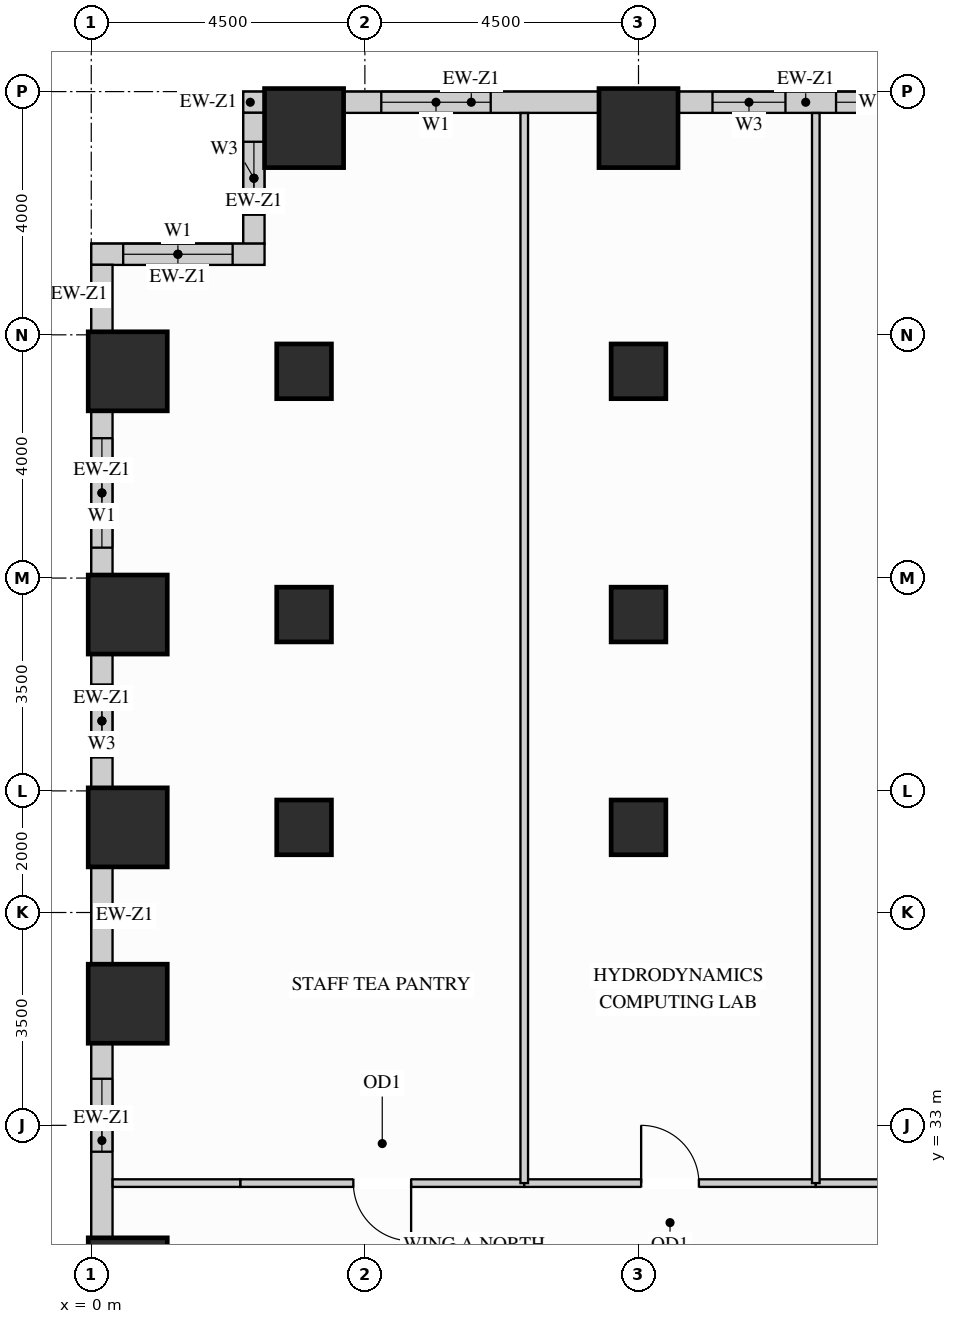
"""IFC4 building model, lengths in metres.
Left out: names, types, materials, properties, quantities, classifications, styles, units other than length and angle.
Written with IfcOpenShell. Run it as: python <this file> out.ifc"""

import sys

from ifc_helpers import new_model, si_unit, direction, frame, frame_2d, origin, origin_2d, place, context, subcontext, project, spatial, rectangle, extrude, source, transform, mapped, element, fill, save


model = new_model("IFC4")
c1 = context("Model", 3, precision=1e-05, world=origin(), true_north=direction((0.0, 1.0)))
c2 = subcontext(c1, "Body", "Model", "MODEL_VIEW")
j1 = project(units=[si_unit("LENGTHUNIT", "METRE"), si_unit("PLANEANGLEUNIT", "RADIAN")], contexts=[c1])
p1 = place(None, origin())
s1 = spatial("IfcSite", under=j1, at=p1, CompositionType="ELEMENT")
p2 = place(p1, origin())
s2 = spatial("IfcBuilding", under=s1, at=p2, CompositionType="ELEMENT")
p3 = place(p2, frame((0.0, 0.0, 58.5)))
s3 = spatial("IfcBuildingStorey", under=s2, at=p3, CompositionType="ELEMENT", Elevation=58.5)
m1 = source(origin(), c2, "Body", "SweptSolid", [
    extrude(rectangle(XDim=0.9, YDim=0.9, at=origin_2d()), origin(), (0.0, 0.0, 1.0), 3.38),
])
for number, where, z_axis, x_axis in (
    (1, (3.5, 37.9, 0.0), (0.0, 0.0, 1.0), (1.0, 0.0, 0.0)),
    (2, (3.5, 41.4, 0.0), (0.0, 0.0, 1.0), (1.0, 0.0, 0.0)),
    (3, (3.5, 45.4, 0.0), (0.0, 0.0, 1.0), (1.0, 0.0, 0.0)),
    (4, (9.0, 37.9, 0.0), (0.0, 0.0, 1.0), (1.0, 0.0, 0.0)),
    (5, (9.0, 41.4, 0.0), (0.0, 0.0, 1.0), (1.0, 0.0, 0.0)),
    (6, (9.0, 45.4, 0.0), (0.0, 0.0, 1.0), (1.0, 0.0, 0.0)),
):
    element("IfcColumn", number, at=place(p3, frame(where, z_axis=z_axis, x_axis=x_axis)), inside=s3, PredefinedType="COLUMN", context=c2, shape_type="MappedRepresentation", body=[
        mapped(m1, transform((0.0, 0.0, 0.0), x_axis=(1.0, 0.0, 0.0), y_axis=(0.0, 1.0, 0.0), z_axis=(0.0, 0.0, 1.0))),
    ])
m2 = source(origin(), c2, "Body", "SweptSolid", [
    extrude(rectangle(XDim=1.3, YDim=1.3, at=origin_2d()), origin(), (0.0, 0.0, 1.0), 3.38),
])
for number, where, z_axis, x_axis in (
    (7, (3.5, 49.4, 0.0), (0.0, 0.0, 1.0), (1.0, 0.0, 0.0)),
    (8, (9.0, 49.4, 0.0), (0.0, 0.0, 1.0), (1.0, 0.0, 0.0)),
    (9, (0.6, 30.5, 0.0), (0.0, 0.0, 1.0), (1.0, 0.0, 0.0)),
    (10, (0.6, 35.0, 0.0), (0.0, 0.0, 1.0), (1.0, 0.0, 0.0)),
    (11, (0.6, 37.9, 0.0), (0.0, 0.0, 1.0), (1.0, 0.0, 0.0)),
    (12, (0.6, 41.4, 0.0), (0.0, 0.0, 1.0), (1.0, 0.0, 0.0)),
    (13, (0.6, 45.4, 0.0), (0.0, 0.0, 1.0), (1.0, 0.0, 0.0)),
):
    element("IfcColumn", number, at=place(p3, frame(where, z_axis=z_axis, x_axis=x_axis)), inside=s3, PredefinedType="COLUMN", context=c2, shape_type="MappedRepresentation", body=[
        mapped(m2, transform((0.0, 0.0, 0.0), x_axis=(1.0, 0.0, 0.0), y_axis=(0.0, 1.0, 0.0), z_axis=(0.0, 0.0, 1.0))),
    ])
p4 = place(p3, frame((13.852, 49.825, 0.0), z_axis=(0.0, 0.0, 1.0), x_axis=(-1.0, 0.0, 0.0)))
e14 = element("IfcWall", 14, at=p4, inside=s3, PredefinedType="SOLIDWALL", context=c2, shape_type="SweptSolid", body=[
    extrude(rectangle(XDim=4.204, YDim=0.35, at=frame_2d((2.102, 0.0))), origin(), (0.0, 0.0, 1.0), 2.51),
])
p5 = place(p4, frame((0.403, 0.0, 0.78)))
e15 = element("IfcOpeningElement", 15, at=p5, cuts=e14, PredefinedType="OPENING", context=c2, shape_type="SweptSolid", body=[
    extrude(rectangle(XDim=1.2, YDim=1.55, at=frame_2d((0.6, 0.775))), frame((0.0, 0.185, 0.0), z_axis=(0.0, -1.0, 0.0), x_axis=(1.0, 0.0, 0.0)), (0.0, 0.0, 1.0), 0.37),
])
p6 = place(p4, frame((2.435, 0.0, 0.78)))
e16 = element("IfcOpeningElement", 16, at=p6, cuts=e14, PredefinedType="OPENING", context=c2, shape_type="SweptSolid", body=[
    extrude(rectangle(XDim=1.2, YDim=1.55, at=frame_2d((0.6, 0.775))), frame((0.0, 0.185, 0.0), z_axis=(0.0, -1.0, 0.0), x_axis=(1.0, 0.0, 0.0)), (0.0, 0.0, 1.0), 0.37),
])
p7 = place(p3, frame((8.352, 49.825, 0.0), z_axis=(0.0, 0.0, 1.0), x_axis=(-1.0, 0.0, 0.0)))
e17 = element("IfcWall", 17, at=p7, inside=s3, PredefinedType="SOLIDWALL", context=c2, shape_type="SweptSolid", body=[
    extrude(rectangle(XDim=4.204, YDim=0.35, at=frame_2d((2.102, 0.0))), origin(), (0.0, 0.0, 1.0), 2.51),
])
p8 = place(p7, frame((1.782, 0.0, 0.78)))
e18 = element("IfcOpeningElement", 18, at=p8, cuts=e17, PredefinedType="OPENING", context=c2, shape_type="SweptSolid", body=[
    extrude(rectangle(XDim=1.8, YDim=1.55, at=frame_2d((0.9, 0.775))), frame((0.0, 0.185, 0.0), z_axis=(0.0, -1.0, 0.0), x_axis=(1.0, 0.0, 0.0)), (0.0, 0.0, 1.0), 0.37),
])
m3 = source(origin(), c2, "Body", "SweptSolid", [
    extrude(rectangle(XDim=0.352, YDim=0.35, at=frame_2d((0.176, 0.0))), origin(), (0.0, 0.0, 1.0), 3.365),
])
p9 = place(p3, frame((2.852, 49.825, 0.0), z_axis=(0.0, 0.0, 1.0), x_axis=(-1.0, 0.0, 0.0)))
e19 = element("IfcWall", 19, at=p9, inside=s3, PredefinedType="SOLIDWALL", context=c2, shape_type="MappedRepresentation", body=[
    mapped(m3, transform((0.0, 0.0, 0.0), x_axis=(1.0, 0.0, 0.0), y_axis=(0.0, 1.0, 0.0), z_axis=(0.0, 0.0, 1.0))),
])
p10 = place(p3, frame((2.675, 49.652, 0.0), z_axis=(0.0, 0.0, 1.0), x_axis=(0.0, -1.0, 0.0)))
e20 = element("IfcWall", 20, at=p10, inside=s3, PredefinedType="SOLIDWALL", context=c2, shape_type="SweptSolid", body=[
    extrude(rectangle(XDim=2.154, YDim=0.35, at=frame_2d((1.077, 0.0))), origin(), (0.0, 0.0, 1.0), 3.365),
])
p11 = place(p10, frame((0.477, 0.0, 0.78)))
e21 = element("IfcOpeningElement", 21, at=p11, cuts=e20, PredefinedType="OPENING", context=c2, shape_type="SweptSolid", body=[
    extrude(rectangle(XDim=1.2, YDim=2.1, at=frame_2d((0.6, 1.05))), frame((0.0, 0.185, 0.0), z_axis=(0.0, -1.0, 0.0), x_axis=(1.0, 0.0, 0.0)), (0.0, 0.0, 1.0), 0.37),
])
p12 = place(p3, frame((2.85, 47.325, 0.0), z_axis=(0.0, 0.0, 1.0), x_axis=(-1.0, 0.0, 0.0)))
e22 = element("IfcWall", 22, at=p12, inside=s3, PredefinedType="SOLIDWALL", context=c2, shape_type="SweptSolid", body=[
    extrude(rectangle(XDim=2.85, YDim=0.35, at=frame_2d((1.425, 0.0))), origin(), (0.0, 0.0, 1.0), 3.365),
])
p13 = place(p12, frame((0.525, 0.0, 0.78)))
e23 = element("IfcOpeningElement", 23, at=p13, cuts=e22, PredefinedType="OPENING", context=c2, shape_type="SweptSolid", body=[
    extrude(rectangle(XDim=1.8, YDim=2.1, at=frame_2d((0.9, 1.05))), frame((0.0, 0.185, 0.0), z_axis=(0.0, -1.0, 0.0), x_axis=(1.0, 0.0, 0.0)), (0.0, 0.0, 1.0), 0.37),
])
m4 = source(origin(), c2, "Body", "SweptSolid", [
    extrude(rectangle(XDim=1.104, YDim=0.35, at=frame_2d((0.552, 0.0))), origin(), (0.0, 0.0, 1.0), 3.365),
])
p14 = place(p3, frame((0.175, 47.152, 0.0), z_axis=(0.0, 0.0, 1.0), x_axis=(0.0, -1.0, 0.0)))
e24 = element("IfcWall", 24, at=p14, inside=s3, PredefinedType="SOLIDWALL", context=c2, shape_type="MappedRepresentation", body=[
    mapped(m4, transform((0.0, 0.0, 0.0), x_axis=(1.0, 0.0, 0.0), y_axis=(0.0, 1.0, 0.0), z_axis=(0.0, 0.0, 1.0))),
])
p15 = place(p3, frame((0.175, 44.752, 0.0), z_axis=(0.0, 0.0, 1.0), x_axis=(0.0, -1.0, 0.0)))
e25 = element("IfcWall", 25, at=p15, inside=s3, PredefinedType="SOLIDWALL", context=c2, shape_type="SweptSolid", body=[
    extrude(rectangle(XDim=2.704, YDim=0.35, at=frame_2d((1.352, 0.0))), origin(), (0.0, 0.0, 1.0), 2.51),
])
p16 = place(p15, frame((0.452, 0.0, 0.78)))
e26 = element("IfcOpeningElement", 26, at=p16, cuts=e25, PredefinedType="OPENING", context=c2, shape_type="SweptSolid", body=[
    extrude(rectangle(XDim=1.8, YDim=1.55, at=frame_2d((0.9, 0.775))), frame((0.0, 0.185, 0.0), z_axis=(0.0, -1.0, 0.0), x_axis=(1.0, 0.0, 0.0)), (0.0, 0.0, 1.0), 0.37),
])
p17 = place(p3, frame((0.175, 40.752, 0.0), z_axis=(0.0, 0.0, 1.0), x_axis=(0.0, -1.0, 0.0)))
e27 = element("IfcWall", 27, at=p17, inside=s3, PredefinedType="SOLIDWALL", context=c2, shape_type="SweptSolid", body=[
    extrude(rectangle(XDim=2.204, YDim=0.35, at=frame_2d((1.102, 0.0))), origin(), (0.0, 0.0, 1.0), 2.51),
])
p18 = place(p17, frame((0.502, 0.0, 0.78)))
e28 = element("IfcOpeningElement", 28, at=p18, cuts=e27, PredefinedType="OPENING", context=c2, shape_type="SweptSolid", body=[
    extrude(rectangle(XDim=1.2, YDim=1.55, at=frame_2d((0.6, 0.775))), frame((0.0, 0.185, 0.0), z_axis=(0.0, -1.0, 0.0), x_axis=(1.0, 0.0, 0.0)), (0.0, 0.0, 1.0), 0.37),
])
m5 = source(origin(), c2, "Body", "SweptSolid", [
    extrude(rectangle(XDim=1.604, YDim=0.35, at=frame_2d((0.802, 0.0))), origin(), (0.0, 0.0, 1.0), 2.51),
])
p19 = place(p3, frame((0.175, 37.252, 0.0), z_axis=(0.0, 0.0, 1.0), x_axis=(0.0, -1.0, 0.0)))
e29 = element("IfcWall", 29, at=p19, inside=s3, PredefinedType="SOLIDWALL", context=c2, shape_type="MappedRepresentation", body=[
    mapped(m5, transform((0.0, 0.0, 0.0), x_axis=(1.0, 0.0, 0.0), y_axis=(0.0, 1.0, 0.0), z_axis=(0.0, 0.0, 1.0))),
])
p20 = place(p3, frame((0.175, 34.352, 0.0), z_axis=(0.0, 0.0, 1.0), x_axis=(0.0, -1.0, 0.0)))
e30 = element("IfcWall", 30, at=p20, inside=s3, PredefinedType="SOLIDWALL", context=c2, shape_type="SweptSolid", body=[
    extrude(rectangle(XDim=3.204, YDim=0.35, at=frame_2d((1.602, 0.0))), origin(), (0.0, 0.0, 1.0), 2.51),
])
p21 = place(p20, frame((0.586, 0.0, 0.78)))
e31 = element("IfcOpeningElement", 31, at=p21, cuts=e30, PredefinedType="OPENING", context=c2, shape_type="SweptSolid", body=[
    extrude(rectangle(XDim=1.2, YDim=1.55, at=frame_2d((0.6, 0.775))), frame((0.0, 0.185, 0.0), z_axis=(0.0, -1.0, 0.0), x_axis=(1.0, 0.0, 0.0)), (0.0, 0.0, 1.0), 0.37),
])
p22 = place(p3, frame((2.45, 32.05, 0.0), z_axis=(0.0, 0.0, 1.0), x_axis=(1.0, 0.0, 0.0)))
e32 = element("IfcWall", 32, at=p22, inside=s3, PredefinedType="PARTITIONING", context=c2, shape_type="SweptSolid", body=[
    extrude(rectangle(XDim=4.671, YDim=0.125, at=frame_2d((2.335, 0.0))), origin(), (0.0, 0.0, 1.0), 3.365),
])
p23 = place(p22, frame((1.861, 0.0, 0.0)))
e33 = element("IfcOpeningElement", 33, at=p23, cuts=e32, PredefinedType="OPENING", context=c2, shape_type="SweptSolid", body=[
    extrude(rectangle(XDim=0.95, YDim=2.15, at=frame_2d((0.475, 1.075))), frame((0.0, 0.073, 0.0), z_axis=(0.0, -1.0, 0.0), x_axis=(1.0, 0.0, 0.0)), (0.0, 0.0, 1.0), 0.145),
])
p24 = place(p3, frame((7.121, 32.05, 0.0), z_axis=(0.0, 0.0, 1.0), x_axis=(1.0, 0.0, 0.0)))
e34 = element("IfcWall", 34, at=p24, inside=s3, PredefinedType="PARTITIONING", context=c2, shape_type="SweptSolid", body=[
    extrude(rectangle(XDim=4.795, YDim=0.125, at=frame_2d((2.397, 0.0))), origin(), (0.0, 0.0, 1.0), 3.365),
])
p25 = place(p24, frame((1.923, 0.0, 0.0)))
e35 = element("IfcOpeningElement", 35, at=p25, cuts=e34, PredefinedType="OPENING", context=c2, shape_type="SweptSolid", body=[
    extrude(rectangle(XDim=0.95, YDim=2.15, at=frame_2d((0.475, 1.075))), frame((0.0, 0.073, 0.0), z_axis=(0.0, -1.0, 0.0), x_axis=(1.0, 0.0, 0.0)), (0.0, 0.0, 1.0), 0.145),
])
p26 = place(p3, frame((11.916, 32.05, 0.0), z_axis=(0.0, 0.0, 1.0), x_axis=(1.0, 0.0, 0.0)))
e36 = element("IfcWall", 36, at=p26, inside=s3, PredefinedType="PARTITIONING", context=c2, shape_type="SweptSolid", body=[
    extrude(rectangle(XDim=4.634, YDim=0.125, at=frame_2d((2.317, 0.0))), origin(), (0.0, 0.0, 1.0), 3.365),
])
p27 = place(p26, frame((1.842, 0.0, 0.0)))
e37 = element("IfcOpeningElement", 37, at=p27, cuts=e36, PredefinedType="OPENING", context=c2, shape_type="SweptSolid", body=[
    extrude(rectangle(XDim=0.95, YDim=2.15, at=frame_2d((0.475, 1.075))), frame((0.0, 0.073, 0.0), z_axis=(0.0, -1.0, 0.0), x_axis=(1.0, 0.0, 0.0)), (0.0, 0.0, 1.0), 0.145),
])
m6 = source(origin(), c2, "Body", "SweptSolid", [
    extrude(rectangle(XDim=2.098, YDim=0.125, at=frame_2d((1.049, 0.0))), origin(), (0.0, 0.0, 1.0), 3.365),
])
p28 = place(p3, frame((0.352, 32.05, 0.0), z_axis=(0.0, 0.0, 1.0), x_axis=(1.0, 0.0, 0.0)))
e38 = element("IfcWall", 38, at=p28, inside=s3, PredefinedType="PARTITIONING", context=c2, shape_type="MappedRepresentation", body=[
    mapped(m6, transform((0.0, 0.0, 0.0), x_axis=(1.0, 0.0, 0.0), y_axis=(0.0, 1.0, 0.0), z_axis=(0.0, 0.0, 1.0))),
])
m7 = source(origin(), c2, "Body", "SweptSolid", [
    extrude(rectangle(XDim=17.598, YDim=0.125, at=frame_2d((8.799, 0.0))), origin(), (0.0, 0.0, 1.0), 3.365),
])
for number, where, z_axis, x_axis in (
    (39, (7.121, 32.05, 0.0), (0.0, 0.0, 1.0), (0.0, 1.0, 0.0)),
    (40, (11.916, 32.05, 0.0), (0.0, 0.0, 1.0), (0.0, 1.0, 0.0)),
):
    element("IfcWall", number, at=place(p3, frame(where, z_axis=z_axis, x_axis=x_axis)), inside=s3, PredefinedType="PARTITIONING", context=c2, shape_type="MappedRepresentation", body=[
        mapped(m7, transform((0.0, 0.0, 0.0), x_axis=(1.0, 0.0, 0.0), y_axis=(0.0, 1.0, 0.0), z_axis=(0.0, 0.0, 1.0))),
    ])
m8 = source(origin(), c2, "Body", "SweptSolid", [
    extrude(rectangle(XDim=0.95, YDim=2.15, at=frame_2d((0.475, 1.075))), frame((0.0, 0.025, 0.0), z_axis=(0.0, -1.0, 0.0), x_axis=(1.0, 0.0, 0.0)), (0.0, 0.0, 1.0), 0.05),
])
p29 = place(p23, origin())
e41 = element("IfcDoor", 41, at=p29, inside=s3, OperationType="SINGLE_SWING_RIGHT", PredefinedType="DOOR", context=c2, shape_type="MappedRepresentation", body=[
    mapped(m8, transform((0.0, 0.0, 0.0), x_axis=(1.0, 0.0, 0.0), y_axis=(0.0, 1.0, 0.0), z_axis=(0.0, 0.0, 1.0))),
])
fill(e33, e41)
p30 = place(p25, origin())
e42 = element("IfcDoor", 42, at=p30, inside=s3, OperationType="SINGLE_SWING_LEFT", PredefinedType="DOOR", context=c2, shape_type="MappedRepresentation", body=[
    mapped(m8, transform((0.0, 0.0, 0.0), x_axis=(1.0, 0.0, 0.0), y_axis=(0.0, 1.0, 0.0), z_axis=(0.0, 0.0, 1.0))),
])
fill(e35, e42)
m9 = source(origin(), c2, "Body", "SweptSolid", [
    extrude(rectangle(XDim=1.8, YDim=1.55, at=frame_2d((0.9, 0.775))), frame((0.0, 0.03, 0.0), z_axis=(0.0, -1.0, 0.0), x_axis=(1.0, 0.0, 0.0)), (0.0, 0.0, 1.0), 0.06),
])
p31 = place(p8, origin())
e43 = element("IfcWindow", 43, at=p31, inside=s3, PartitioningType="SINGLE_PANEL", PredefinedType="WINDOW", context=c2, shape_type="MappedRepresentation", body=[
    mapped(m9, transform((0.0, 0.0, 0.0), x_axis=(1.0, 0.0, 0.0), y_axis=(0.0, 1.0, 0.0), z_axis=(0.0, 0.0, 1.0))),
])
fill(e18, e43)
m10 = source(origin(), c2, "Body", "SweptSolid", [
    extrude(rectangle(XDim=1.8, YDim=2.1, at=frame_2d((0.9, 1.05))), frame((0.0, 0.03, 0.0), z_axis=(0.0, -1.0, 0.0), x_axis=(1.0, 0.0, 0.0)), (0.0, 0.0, 1.0), 0.06),
])
p32 = place(p13, origin())
e44 = element("IfcWindow", 44, at=p32, inside=s3, PartitioningType="SINGLE_PANEL", PredefinedType="WINDOW", context=c2, shape_type="MappedRepresentation", body=[
    mapped(m10, transform((0.0, 0.0, 0.0), x_axis=(1.0, 0.0, 0.0), y_axis=(0.0, 1.0, 0.0), z_axis=(0.0, 0.0, 1.0))),
])
fill(e23, e44)
p33 = place(p16, origin())
e45 = element("IfcWindow", 45, at=p33, inside=s3, PartitioningType="SINGLE_PANEL", PredefinedType="WINDOW", context=c2, shape_type="MappedRepresentation", body=[
    mapped(m9, transform((0.0, 0.0, 0.0), x_axis=(1.0, 0.0, 0.0), y_axis=(0.0, 1.0, 0.0), z_axis=(0.0, 0.0, 1.0))),
])
fill(e26, e45)
m11 = source(origin(), c2, "Body", "SweptSolid", [
    extrude(rectangle(XDim=1.2, YDim=1.55, at=frame_2d((0.6, 0.775))), frame((0.0, 0.03, 0.0), z_axis=(0.0, -1.0, 0.0), x_axis=(1.0, 0.0, 0.0)), (0.0, 0.0, 1.0), 0.06),
])
p34 = place(p5, origin())
e46 = element("IfcWindow", 46, at=p34, inside=s3, PartitioningType="SINGLE_PANEL", PredefinedType="WINDOW", context=c2, shape_type="MappedRepresentation", body=[
    mapped(m11, transform((0.0, 0.0, 0.0), x_axis=(1.0, 0.0, 0.0), y_axis=(0.0, 1.0, 0.0), z_axis=(0.0, 0.0, 1.0))),
])
fill(e15, e46)
p35 = place(p6, origin())
e47 = element("IfcWindow", 47, at=p35, inside=s3, PartitioningType="SINGLE_PANEL", PredefinedType="WINDOW", context=c2, shape_type="MappedRepresentation", body=[
    mapped(m11, transform((0.0, 0.0, 0.0), x_axis=(1.0, 0.0, 0.0), y_axis=(0.0, 1.0, 0.0), z_axis=(0.0, 0.0, 1.0))),
])
fill(e16, e47)
m12 = source(origin(), c2, "Body", "SweptSolid", [
    extrude(rectangle(XDim=1.2, YDim=2.1, at=frame_2d((0.6, 1.05))), frame((0.0, 0.03, 0.0), z_axis=(0.0, -1.0, 0.0), x_axis=(1.0, 0.0, 0.0)), (0.0, 0.0, 1.0), 0.06),
])
p36 = place(p11, origin())
e48 = element("IfcWindow", 48, at=p36, inside=s3, PartitioningType="SINGLE_PANEL", PredefinedType="WINDOW", context=c2, shape_type="MappedRepresentation", body=[
    mapped(m12, transform((0.0, 0.0, 0.0), x_axis=(1.0, 0.0, 0.0), y_axis=(0.0, 1.0, 0.0), z_axis=(0.0, 0.0, 1.0))),
])
fill(e21, e48)
p37 = place(p18, origin())
e49 = element("IfcWindow", 49, at=p37, inside=s3, PartitioningType="SINGLE_PANEL", PredefinedType="WINDOW", context=c2, shape_type="MappedRepresentation", body=[
    mapped(m11, transform((0.0, 0.0, 0.0), x_axis=(1.0, 0.0, 0.0), y_axis=(0.0, 1.0, 0.0), z_axis=(0.0, 0.0, 1.0))),
])
fill(e28, e49)
p38 = place(p21, origin())
e50 = element("IfcWindow", 50, at=p38, inside=s3, PartitioningType="SINGLE_PANEL", PredefinedType="WINDOW", context=c2, shape_type="MappedRepresentation", body=[
    mapped(m11, transform((0.0, 0.0, 0.0), x_axis=(1.0, 0.0, 0.0), y_axis=(0.0, 1.0, 0.0), z_axis=(0.0, 0.0, 1.0))),
])
fill(e31, e50)
save(model, sys.argv[1])
